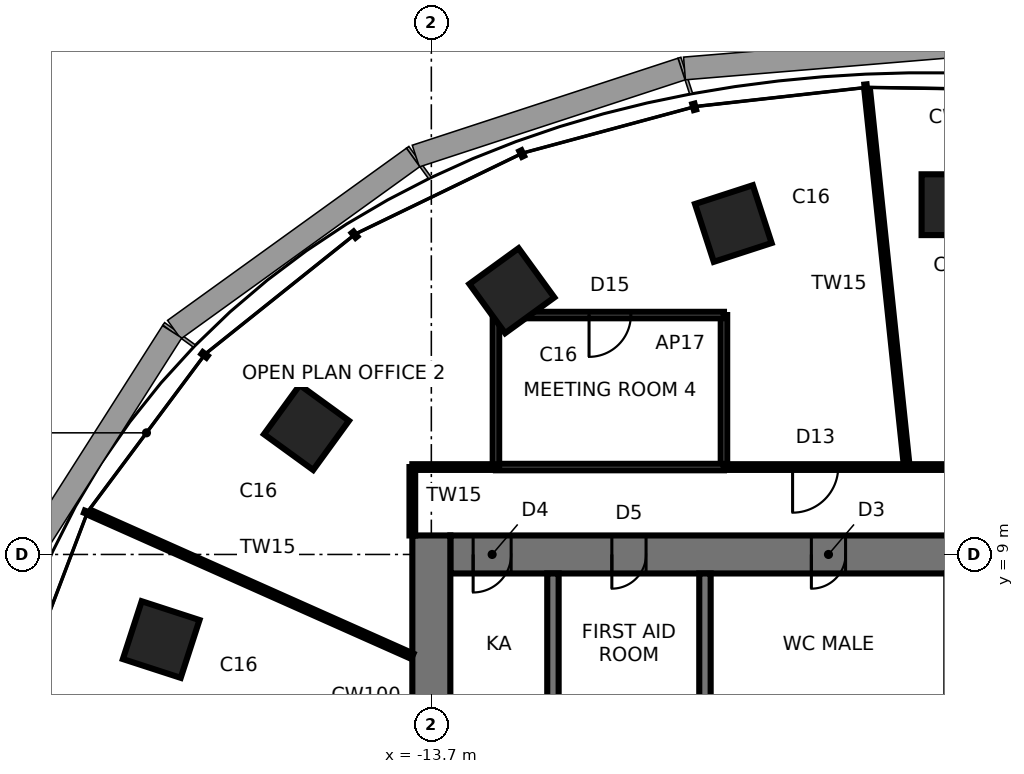
"""IFC4 building model, lengths in metres.
Left out: names, types, materials, properties, quantities, classifications, styles, units other than length and angle.
Written with IfcOpenShell. Run it as: python <this file> out.ifc"""

import sys

from ifc_helpers import new_model, si_unit, direction, frame, frame_2d, origin, origin_2d, place, context, subcontext, project, spatial, rectangle, extrude, element, fill, save


model = new_model("IFC4")
c1 = context("Model", 3, precision=1e-05, world=origin(), true_north=direction((0.0, 1.0)))
c2 = subcontext(c1, "Body", "Model", "MODEL_VIEW")
j1 = project(units=[si_unit("LENGTHUNIT", "METRE"), si_unit("PLANEANGLEUNIT", "RADIAN")], contexts=[c1])
p1 = place(None, origin())
s1 = spatial("IfcSite", under=j1, at=p1, CompositionType="ELEMENT")
p2 = place(p1, origin())
s2 = spatial("IfcBuilding", under=s1, at=p2, CompositionType="ELEMENT")
p3 = place(p2, frame((0.0, 0.0, 127.5)))
s3 = spatial("IfcBuildingStorey", under=s2, at=p3, CompositionType="ELEMENT", Elevation=127.5)
for number, where, z_axis, x_axis in (
    (1, (0.0, 18.204, 0.0), (0.0, 0.0, 1.0), (0.0, 1.0, 0.0)),
    (2, (-5.754, 17.708, 0.0), (0.0, 0.0, 1.0), (-0.309, 0.951, 0.0)),
    (3, (-11.581, 15.94, 0.0), (0.0, 0.0, 1.0), (-0.588, 0.809, 0.0)),
    (4, (-16.986, 12.341, 0.0), (0.0, 0.0, 1.0), (-0.809, 0.588, 0.0)),
    (5, (-20.808, 6.761, 0.0), (0.0, 0.0, 1.0), (-0.951, 0.309, 0.0)),
):
    element("IfcColumn", number, at=place(p3, frame(where, z_axis=z_axis, x_axis=x_axis)), inside=s3, PredefinedType="COLUMN", context=c2, shape_type="SweptSolid", body=[
        extrude(rectangle(XDim=1.6, YDim=1.6, at=origin_2d()), origin(), (0.0, 0.0, 1.0), 3.9),
    ])
p4 = place(p3, frame((13.2, 9.0, 0.0), z_axis=(0.0, 0.0, 1.0), x_axis=(-1.0, 0.0, 0.0)))
e6 = element("IfcWall", 6, at=p4, inside=s3, PredefinedType="SHEAR", context=c2, shape_type="SweptSolid", body=[
    extrude(rectangle(XDim=26.4, YDim=1.0, at=frame_2d((13.2, 0.0))), origin(), (0.0, 0.0, 1.0), 3.9),
])
p5 = place(p4, frame((2.65, 0.0, 0.0)))
e7 = element("IfcOpeningElement", 7, at=p5, cuts=e6, PredefinedType="OPENING", context=c2, shape_type="SweptSolid", body=[
    extrude(rectangle(XDim=0.9, YDim=2.1, at=frame_2d((0.45, 1.05))), frame((0.0, 0.51, 0.0), z_axis=(0.0, -1.0, 0.0), x_axis=(1.0, 0.0, 0.0)), (0.0, 0.0, 1.0), 1.02),
])
p6 = place(p4, frame((9.5, 0.0, 0.0)))
e8 = element("IfcOpeningElement", 8, at=p6, cuts=e6, PredefinedType="OPENING", context=c2, shape_type="SweptSolid", body=[
    extrude(rectangle(XDim=0.9, YDim=2.1, at=frame_2d((0.45, 1.05))), frame((0.0, 0.51, 0.0), z_axis=(0.0, -1.0, 0.0), x_axis=(1.0, 0.0, 0.0)), (0.0, 0.0, 1.0), 1.02),
])
p7 = place(p4, frame((16.0, 0.0, 0.0)))
e9 = element("IfcOpeningElement", 9, at=p7, cuts=e6, PredefinedType="OPENING", context=c2, shape_type="SweptSolid", body=[
    extrude(rectangle(XDim=0.9, YDim=2.1, at=frame_2d((0.45, 1.05))), frame((0.0, 0.51, 0.0), z_axis=(0.0, -1.0, 0.0), x_axis=(1.0, 0.0, 0.0)), (0.0, 0.0, 1.0), 1.02),
])
p8 = place(p4, frame((21.25, 0.0, 0.0)))
e10 = element("IfcOpeningElement", 10, at=p8, cuts=e6, PredefinedType="OPENING", context=c2, shape_type="SweptSolid", body=[
    extrude(rectangle(XDim=0.9, YDim=2.1, at=frame_2d((0.45, 1.05))), frame((0.0, 0.51, 0.0), z_axis=(0.0, -1.0, 0.0), x_axis=(1.0, 0.0, 0.0)), (0.0, 0.0, 1.0), 1.02),
])
p9 = place(p4, frame((24.8, 0.0, 0.0)))
e11 = element("IfcOpeningElement", 11, at=p9, cuts=e6, PredefinedType="OPENING", context=c2, shape_type="SweptSolid", body=[
    extrude(rectangle(XDim=1.0, YDim=2.1, at=frame_2d((0.5, 1.05))), frame((0.0, 0.51, 0.0), z_axis=(0.0, -1.0, 0.0), x_axis=(1.0, 0.0, 0.0)), (0.0, 0.0, 1.0), 1.02),
])
p10 = place(p3, frame((-13.7, 9.5, 0.0), z_axis=(0.0, 0.0, 1.0), x_axis=(0.0, -1.0, 0.0)))
e12 = element("IfcWall", 12, at=p10, inside=s3, PredefinedType="SHEAR", context=c2, shape_type="SweptSolid", body=[
    extrude(rectangle(XDim=19.0, YDim=1.0, at=frame_2d((9.5, 0.0))), origin(), (0.0, 0.0, 1.0), 3.9),
])
p11 = place(p10, frame((8.6, 0.0, 0.0)))
e13 = element("IfcOpeningElement", 13, at=p11, cuts=e12, PredefinedType="OPENING", context=c2, shape_type="SweptSolid", body=[
    extrude(rectangle(XDim=1.8, YDim=2.4, at=frame_2d((0.9, 1.2))), frame((0.0, 0.51, 0.0), z_axis=(0.0, -1.0, 0.0), x_axis=(1.0, 0.0, 0.0)), (0.0, 0.0, 1.0), 1.02),
])
for number, where, z_axis, x_axis in (
    (14, (-6.5, 4.75, 0.0), (0.0, 0.0, 1.0), (0.0, 1.0, 0.0)),
    (15, (-10.5, 4.75, 0.0), (0.0, 0.0, 1.0), (0.0, 1.0, 0.0)),
):
    element("IfcWall", number, at=place(p3, frame(where, z_axis=z_axis, x_axis=x_axis)), inside=s3, PredefinedType="SHEAR", context=c2, shape_type="SweptSolid", body=[
        extrude(rectangle(XDim=3.75, YDim=0.3, at=frame_2d((1.875, 0.0))), origin(), (0.0, 0.0, 1.0), 3.9),
    ])
p12 = place(p3, frame((16.0, 11.3, 0.0), z_axis=(0.0, 0.0, 1.0), x_axis=(-1.0, 0.0, 0.0)))
e16 = element("IfcWall", 16, at=p12, inside=s3, PredefinedType="PARTITIONING", context=c2, shape_type="SweptSolid", body=[
    extrude(rectangle(XDim=22.0, YDim=0.15, at=frame_2d((11.0, 0.0))), origin(), (0.0, 0.0, 1.0), 3.74),
])
p13 = place(p12, frame((4.4, 0.0, 0.0)))
e17 = element("IfcOpeningElement", 17, at=p13, cuts=e16, PredefinedType="OPENING", context=c2, shape_type="SweptSolid", body=[
    extrude(rectangle(XDim=1.2, YDim=2.4, at=frame_2d((0.6, 1.2))), frame((0.0, 0.085, 0.0), z_axis=(0.0, -1.0, 0.0), x_axis=(1.0, 0.0, 0.0)), (0.0, 0.0, 1.0), 0.17),
])
p14 = place(p12, frame((18.994, 0.0, 0.0)))
e18 = element("IfcOpeningElement", 18, at=p14, cuts=e16, PredefinedType="OPENING", context=c2, shape_type="SweptSolid", body=[
    extrude(rectangle(XDim=1.2, YDim=2.4, at=frame_2d((0.6, 1.2))), frame((0.0, 0.085, 0.0), z_axis=(0.0, -1.0, 0.0), x_axis=(1.0, 0.0, 0.0)), (0.0, 0.0, 1.0), 0.17),
])
p15 = place(p3, frame((-1.188, 11.3, 0.0), z_axis=(0.0, 0.0, 1.0), x_axis=(-0.104522843542, 0.994522486009, 0.0)))
e19 = element("IfcWall", 19, at=p15, inside=s3, PredefinedType="PARTITIONING", context=c2, shape_type="SweptSolid", body=[
    extrude(rectangle(XDim=9.967, YDim=0.15, at=frame_2d((4.983, 0.0))), origin(), (0.0, 0.0, 1.0), 3.74),
])
p16 = place(p3, frame((-6.0, 11.3, 0.0), z_axis=(0.0, 0.0, 1.0), x_axis=(0.0, 1.0, 0.0)))
e20 = element("IfcWall", 20, at=p16, inside=s3, PredefinedType="PARTITIONING", context=c2, shape_type="SweptSolid", body=[
    extrude(rectangle(XDim=4.0, YDim=0.17, at=frame_2d((2.0, 0.0))), origin(), (0.0, 0.0, 1.0), 3.74),
])
p17 = place(p3, frame((-6.0, 15.3, 0.0), z_axis=(0.0, 0.0, 1.0), x_axis=(-1.0, 0.0, 0.0)))
e21 = element("IfcWall", 21, at=p17, inside=s3, PredefinedType="PARTITIONING", context=c2, shape_type="SweptSolid", body=[
    extrude(rectangle(XDim=6.0, YDim=0.17, at=frame_2d((3.0, 0.0))), origin(), (0.0, 0.0, 1.0), 3.74),
])
p18 = place(p17, frame((2.45, 0.0, 0.0)))
e22 = element("IfcOpeningElement", 22, at=p18, cuts=e21, PredefinedType="OPENING", context=c2, shape_type="SweptSolid", body=[
    extrude(rectangle(XDim=1.1, YDim=2.4, at=frame_2d((0.55, 1.2))), frame((0.0, 0.095, 0.0), z_axis=(0.0, -1.0, 0.0), x_axis=(1.0, 0.0, 0.0)), (0.0, 0.0, 1.0), 0.19),
])
p19 = place(p3, frame((-12.0, 11.3, 0.0), z_axis=(0.0, 0.0, 1.0), x_axis=(1.0, 0.0, 0.0)))
e23 = element("IfcWall", 23, at=p19, inside=s3, PredefinedType="PARTITIONING", context=c2, shape_type="SweptSolid", body=[
    extrude(rectangle(XDim=6.0, YDim=0.17, at=frame_2d((3.0, 0.0))), origin(), (0.0, 0.0, 1.0), 3.74),
])
p20 = place(p3, frame((-12.0, 15.3, 0.0), z_axis=(0.0, 0.0, 1.0), x_axis=(0.0, -1.0, 0.0)))
e24 = element("IfcWall", 24, at=p20, inside=s3, PredefinedType="PARTITIONING", context=c2, shape_type="SweptSolid", body=[
    extrude(rectangle(XDim=4.0, YDim=0.17, at=frame_2d((2.0, 0.0))), origin(), (0.0, 0.0, 1.0), 3.74),
])
p21 = place(p3, frame((-12.0, 11.3, 0.0), z_axis=(0.0, 0.0, 1.0), x_axis=(-1.0, 0.0, 0.0)))
e25 = element("IfcWall", 25, at=p21, inside=s3, PredefinedType="PARTITIONING", context=c2, shape_type="SweptSolid", body=[
    extrude(rectangle(XDim=2.2, YDim=0.15, at=frame_2d((1.1, 0.0))), origin(), (0.0, 0.0, 1.0), 3.74),
])
p22 = place(p3, frame((-14.2, 11.3, 0.0), z_axis=(0.0, 0.0, 1.0), x_axis=(0.0, -1.0, 0.0)))
e26 = element("IfcWall", 26, at=p22, inside=s3, PredefinedType="PARTITIONING", context=c2, shape_type="SweptSolid", body=[
    extrude(rectangle(XDim=1.8, YDim=0.15, at=frame_2d((0.9, 0.0))), origin(), (0.0, 0.0, 1.0), 3.74),
])
p23 = place(p3, frame((-14.2, 6.322, 0.0), z_axis=(0.0, 0.0, 1.0), x_axis=(-0.913544220381, 0.406739421999, 0.0)))
e27 = element("IfcWall", 27, at=p23, inside=s3, PredefinedType="PARTITIONING", context=c2, shape_type="SweptSolid", body=[
    extrude(rectangle(XDim=9.271, YDim=0.15, at=frame_2d((4.636, 0.0))), origin(), (0.0, 0.0, 1.0), 3.74),
])
p24 = place(p7, origin())
e28 = element("IfcDoor", 28, at=p24, inside=s3, OperationType="SINGLE_SWING_RIGHT", PredefinedType="DOOR", context=c2, shape_type="SweptSolid", body=[
    extrude(rectangle(XDim=0.82, YDim=2.06, at=frame_2d((0.45, 1.03))), frame((0.0, 0.025, 0.0), z_axis=(0.0, -1.0, 0.0), x_axis=(1.0, 0.0, 0.0)), (0.0, 0.0, 1.0), 0.05),
    extrude(rectangle(XDim=0.04, YDim=2.1, at=frame_2d((0.02, 1.05))), frame((0.0, 0.25, 0.0), z_axis=(0.0, -1.0, 0.0), x_axis=(1.0, 0.0, 0.0)), (0.0, 0.0, 1.0), 0.5),
    extrude(rectangle(XDim=0.04, YDim=2.1, at=frame_2d((0.88, 1.05))), frame((0.0, 0.25, 0.0), z_axis=(0.0, -1.0, 0.0), x_axis=(1.0, 0.0, 0.0)), (0.0, 0.0, 1.0), 0.5),
    extrude(rectangle(XDim=0.82, YDim=0.04, at=frame_2d((0.45, 2.08))), frame((0.0, 0.25, 0.0), z_axis=(0.0, -1.0, 0.0), x_axis=(1.0, 0.0, 0.0)), (0.0, 0.0, 1.0), 0.5),
])
fill(e9, e28)
p25 = place(p8, origin())
e29 = element("IfcDoor", 29, at=p25, inside=s3, OperationType="SINGLE_SWING_RIGHT", PredefinedType="DOOR", context=c2, shape_type="SweptSolid", body=[
    extrude(rectangle(XDim=0.82, YDim=2.06, at=frame_2d((0.45, 1.03))), frame((0.0, 0.025, 0.0), z_axis=(0.0, -1.0, 0.0), x_axis=(1.0, 0.0, 0.0)), (0.0, 0.0, 1.0), 0.05),
    extrude(rectangle(XDim=0.04, YDim=2.1, at=frame_2d((0.02, 1.05))), frame((0.0, 0.25, 0.0), z_axis=(0.0, -1.0, 0.0), x_axis=(1.0, 0.0, 0.0)), (0.0, 0.0, 1.0), 0.5),
    extrude(rectangle(XDim=0.04, YDim=2.1, at=frame_2d((0.88, 1.05))), frame((0.0, 0.25, 0.0), z_axis=(0.0, -1.0, 0.0), x_axis=(1.0, 0.0, 0.0)), (0.0, 0.0, 1.0), 0.5),
    extrude(rectangle(XDim=0.82, YDim=0.04, at=frame_2d((0.45, 2.08))), frame((0.0, 0.25, 0.0), z_axis=(0.0, -1.0, 0.0), x_axis=(1.0, 0.0, 0.0)), (0.0, 0.0, 1.0), 0.5),
])
fill(e10, e29)
p26 = place(p9, origin())
e30 = element("IfcDoor", 30, at=p26, inside=s3, OperationType="SINGLE_SWING_RIGHT", PredefinedType="DOOR", context=c2, shape_type="SweptSolid", body=[
    extrude(rectangle(XDim=0.92, YDim=2.06, at=frame_2d((0.5, 1.03))), frame((0.0, 0.025, 0.0), z_axis=(0.0, -1.0, 0.0), x_axis=(1.0, 0.0, 0.0)), (0.0, 0.0, 1.0), 0.05),
    extrude(rectangle(XDim=0.04, YDim=2.1, at=frame_2d((0.02, 1.05))), frame((0.0, 0.25, 0.0), z_axis=(0.0, -1.0, 0.0), x_axis=(1.0, 0.0, 0.0)), (0.0, 0.0, 1.0), 0.5),
    extrude(rectangle(XDim=0.04, YDim=2.1, at=frame_2d((0.98, 1.05))), frame((0.0, 0.25, 0.0), z_axis=(0.0, -1.0, 0.0), x_axis=(1.0, 0.0, 0.0)), (0.0, 0.0, 1.0), 0.5),
    extrude(rectangle(XDim=0.92, YDim=0.04, at=frame_2d((0.5, 2.08))), frame((0.0, 0.25, 0.0), z_axis=(0.0, -1.0, 0.0), x_axis=(1.0, 0.0, 0.0)), (0.0, 0.0, 1.0), 0.5),
])
fill(e11, e30)
p27 = place(p18, origin())
e31 = element("IfcDoor", 31, at=p27, inside=s3, OperationType="SINGLE_SWING_RIGHT", PredefinedType="DOOR", context=c2, shape_type="SweptSolid", body=[
    extrude(rectangle(XDim=1.1, YDim=2.4, at=frame_2d((0.55, 1.2))), frame((0.0, 0.025, 0.0), z_axis=(0.0, -1.0, 0.0), x_axis=(1.0, 0.0, 0.0)), (0.0, 0.0, 1.0), 0.05),
])
fill(e22, e31)
p28 = place(p14, origin())
e32 = element("IfcDoor", 32, at=p28, inside=s3, OperationType="SINGLE_SWING_RIGHT", PredefinedType="DOOR", context=c2, shape_type="SweptSolid", body=[
    extrude(rectangle(XDim=1.2, YDim=2.4, at=frame_2d((0.6, 1.2))), frame((0.0, 0.025, 0.0), z_axis=(0.0, -1.0, 0.0), x_axis=(1.0, 0.0, 0.0)), (0.0, 0.0, 1.0), 0.05),
])
fill(e18, e32)
save(model, sys.argv[1])
